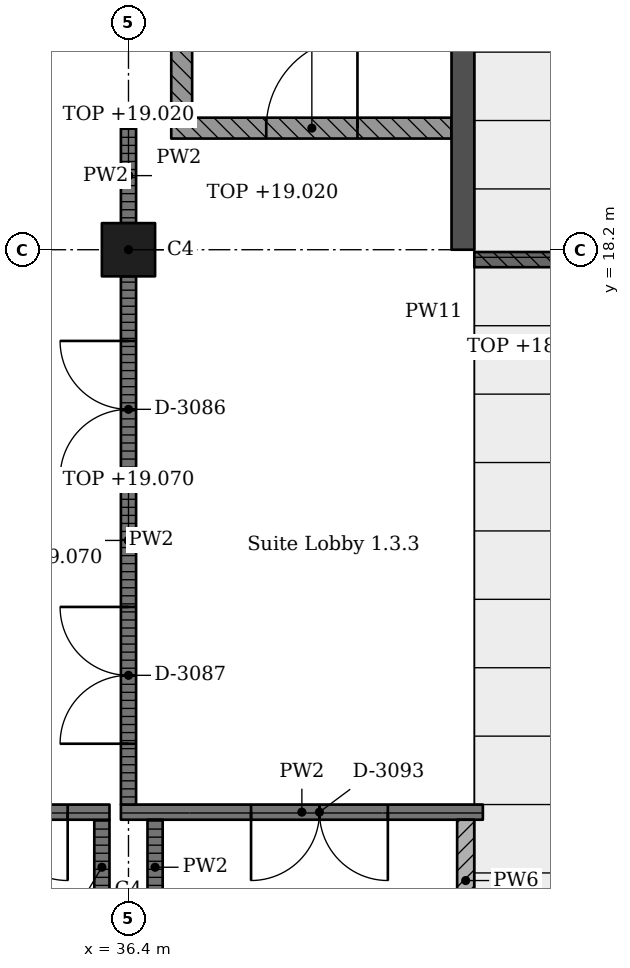
"""IFC4 building model, lengths in metres.
Left out: names, types, materials, properties, quantities, classifications, styles, units other than length and angle.
Written with IfcOpenShell. Run it as: python <this file> out.ifc"""

import sys

from ifc_helpers import new_model, si_unit, direction, frame, frame_2d, origin, origin_2d, place, context, subcontext, project, spatial, rectangle, extrude, element, fill, save


model = new_model("IFC4")
c1 = context("Model", 3, precision=1e-05, world=origin(), true_north=direction((0.0, 1.0)))
c2 = subcontext(c1, "Body", "Model", "MODEL_VIEW")
j1 = project(units=[si_unit("LENGTHUNIT", "METRE"), si_unit("PLANEANGLEUNIT", "RADIAN")], contexts=[c1])
p1 = place(None, origin())
s1 = spatial("IfcSite", under=j1, at=p1, CompositionType="ELEMENT")
p2 = place(p1, origin())
s2 = spatial("IfcBuilding", under=s1, at=p2, CompositionType="ELEMENT")
p3 = place(p2, frame((0.0, 0.0, 15.47)))
s3 = spatial("IfcBuildingStorey", under=s2, at=p3, CompositionType="ELEMENT", Elevation=15.47)
p4 = place(p3, frame((36.4, 18.2, 0.0), z_axis=(0.0, 0.0, 1.0), x_axis=(1.0, 0.0, 0.0)))
e1 = element("IfcColumn", 1, at=p4, inside=s3, PredefinedType="COLUMN", context=c2, shape_type="SweptSolid", body=[
    extrude(rectangle(XDim=0.7, YDim=0.7, at=origin_2d()), origin(), (0.0, 0.0, 1.0), 4.55),
])
p5 = place(p3, frame((40.8, 40.95, 0.0), z_axis=(0.0, 0.0, 1.0), x_axis=(0.0, -1.0, 0.0)))
e2 = element("IfcWall", 2, at=p5, inside=s3, PredefinedType="SHEAR", context=c2, shape_type="SweptSolid", body=[
    extrude(rectangle(XDim=22.75, YDim=0.3, at=frame_2d((11.375, 0.0))), origin(), (0.0, 0.0, 1.0), 4.55),
])
p6 = place(p3, frame((36.05, 9.45, 0.0), z_axis=(0.0, 0.0, 1.0), x_axis=(0.0, 1.0, 0.0)))
e3 = element("IfcWall", 3, at=p6, inside=s3, PredefinedType="PARTITIONING", context=c2, shape_type="SweptSolid", body=[
    extrude(rectangle(XDim=1.25, YDim=0.2, at=frame_2d((0.625, 0.0))), origin(), (0.0, 0.0, 1.0), 4.3),
])
p7 = place(p3, frame((36.15, 10.8, 0.0), z_axis=(0.0, 0.0, 1.0), x_axis=(-1.0, 0.0, 0.0)))
e4 = element("IfcWall", 4, at=p7, inside=s3, PredefinedType="PARTITIONING", context=c2, shape_type="SweptSolid", body=[
    extrude(rectangle(XDim=2.85, YDim=0.2, at=frame_2d((1.425, 0.0))), origin(), (0.0, 0.0, 1.0), 4.3),
])
p8 = place(p7, frame((0.55, 0.0, 0.0)))
e5 = element("IfcOpeningElement", 5, at=p8, cuts=e4, PredefinedType="OPENING", context=c2, shape_type="SweptSolid", body=[
    extrude(rectangle(XDim=1.8, YDim=2.4, at=frame_2d((0.9, 1.2))), frame((0.0, 0.11, 0.0), z_axis=(0.0, -1.0, 0.0), x_axis=(1.0, 0.0, 0.0)), (0.0, 0.0, 1.0), 0.22),
])
p9 = place(p3, frame((36.3, 10.8, 0.0), z_axis=(0.0, 0.0, 1.0), x_axis=(1.0, 0.0, 0.0)))
e6 = element("IfcWall", 6, at=p9, inside=s3, PredefinedType="PARTITIONING", context=c2, shape_type="SweptSolid", body=[
    extrude(rectangle(XDim=4.762, YDim=0.2, at=frame_2d((2.381, 0.0))), origin(), (0.0, 0.0, 1.0), 4.3),
])
p10 = place(p9, frame((1.712, 0.0, 0.0)))
e7 = element("IfcOpeningElement", 7, at=p10, cuts=e6, PredefinedType="OPENING", context=c2, shape_type="SweptSolid", body=[
    extrude(rectangle(XDim=1.8, YDim=2.4, at=frame_2d((0.9, 1.2))), frame((0.0, 0.11, 0.0), z_axis=(0.0, -1.0, 0.0), x_axis=(1.0, 0.0, 0.0)), (0.0, 0.0, 1.0), 0.22),
])
p11 = place(p3, frame((36.4, 17.85, 0.0), z_axis=(0.0, 0.0, 1.0), x_axis=(0.0, -1.0, 0.0)))
e8 = element("IfcWall", 8, at=p11, inside=s3, PredefinedType="PARTITIONING", context=c2, shape_type="SweptSolid", body=[
    extrude(rectangle(XDim=6.95, YDim=0.2, at=frame_2d((3.475, 0.0))), origin(), (0.0, 0.0, 1.0), 3.6),
])
p12 = place(p11, frame((0.85, 0.0, 0.0)))
e9 = element("IfcOpeningElement", 9, at=p12, cuts=e8, PredefinedType="OPENING", context=c2, shape_type="SweptSolid", body=[
    extrude(rectangle(XDim=1.8, YDim=2.4, at=frame_2d((0.9, 1.2))), frame((0.0, 0.11, 0.0), z_axis=(0.0, -1.0, 0.0), x_axis=(1.0, 0.0, 0.0)), (0.0, 0.0, 1.0), 0.22),
])
p13 = place(p11, frame((4.35, 0.0, 0.0)))
e10 = element("IfcOpeningElement", 10, at=p13, cuts=e8, PredefinedType="OPENING", context=c2, shape_type="SweptSolid", body=[
    extrude(rectangle(XDim=1.8, YDim=2.4, at=frame_2d((0.9, 1.2))), frame((0.0, 0.11, 0.0), z_axis=(0.0, -1.0, 0.0), x_axis=(1.0, 0.0, 0.0)), (0.0, 0.0, 1.0), 0.22),
])
p14 = place(p3, frame((36.4, 19.8, 0.0), z_axis=(0.0, 0.0, 1.0), x_axis=(0.0, -1.0, 0.0)))
e11 = element("IfcWall", 11, at=p14, inside=s3, PredefinedType="PARTITIONING", context=c2, shape_type="SweptSolid", body=[
    extrude(rectangle(XDim=1.25, YDim=0.2, at=frame_2d((0.625, 0.0))), origin(), (0.0, 0.0, 1.0), 3.55),
])
p15 = place(p3, frame((36.75, 10.7, 0.0), z_axis=(0.0, 0.0, 1.0), x_axis=(0.0, -1.0, 0.0)))
e12 = element("IfcWall", 12, at=p15, inside=s3, PredefinedType="PARTITIONING", context=c2, shape_type="SweptSolid", body=[
    extrude(rectangle(XDim=1.25, YDim=0.2, at=frame_2d((0.625, 0.0))), origin(), (0.0, 0.0, 1.0), 4.3),
])
p16 = place(p3, frame((36.962, 19.8, 0.0), z_axis=(0.0, 0.0, 1.0), x_axis=(1.0, 0.0, 0.0)))
e13 = element("IfcWall", 13, at=p16, inside=s3, PredefinedType="SOLIDWALL", context=c2, shape_type="SweptSolid", body=[
    extrude(rectangle(XDim=3.688, YDim=0.275, at=frame_2d((1.844, 0.0))), origin(), (0.0, 0.0, 1.0), 4.3),
])
p17 = place(p16, frame((1.25, 0.0, 0.0)))
e14 = element("IfcOpeningElement", 14, at=p17, cuts=e13, PredefinedType="OPENING", context=c2, shape_type="SweptSolid", body=[
    extrude(rectangle(XDim=1.2, YDim=2.4, at=frame_2d((0.6, 1.2))), frame((0.0, 0.147, 0.0), z_axis=(0.0, -1.0, 0.0), x_axis=(1.0, 0.0, 0.0)), (0.0, 0.0, 1.0), 0.295),
])
p18 = place(p3, frame((37.1, 26.837, 0.0), z_axis=(0.0, 0.0, 1.0), x_axis=(0.0, -1.0, 0.0)))
e15 = element("IfcWall", 15, at=p18, inside=s3, PredefinedType="SOLIDWALL", context=c2, shape_type="SweptSolid", body=[
    extrude(rectangle(XDim=6.9, YDim=0.275, at=frame_2d((3.45, 0.0))), origin(), (0.0, 0.0, 1.0), 4.3),
])
p19 = place(p3, frame((40.836, 10.7, 0.0), z_axis=(0.0, 0.0, 1.0), x_axis=(0.0, -1.0, 0.0)))
e16 = element("IfcWall", 16, at=p19, inside=s3, PredefinedType="PARTITIONING", context=c2, shape_type="SweptSolid", body=[
    extrude(rectangle(XDim=1.6, YDim=0.225, at=frame_2d((0.8, 0.0))), origin(), (0.0, 0.0, 1.0), 4.3),
])
p20 = place(p3, frame((40.95, 18.07, 0.0), z_axis=(0.0, 0.0, 1.0), x_axis=(1.0, 0.0, 0.0)))
e17 = element("IfcWall", 17, at=p20, inside=s3, PredefinedType="PARTITIONING", context=c2, shape_type="SweptSolid", body=[
    extrude(rectangle(XDim=4.25, YDim=0.2, at=frame_2d((2.125, 0.0))), origin(), (0.0, 0.0, 1.0), 2.91),
])
p21 = place(p20, frame((1.125, 0.0, 1.1)))
e18 = element("IfcOpeningElement", 18, at=p21, cuts=e17, PredefinedType="OPENING", context=c2, shape_type="SweptSolid", body=[
    extrude(rectangle(XDim=2.0, YDim=1.3, at=frame_2d((1.0, 0.65))), frame((0.0, 0.11, 0.0), z_axis=(0.0, -1.0, 0.0), x_axis=(1.0, 0.0, 0.0)), (0.0, 0.0, 1.0), 0.22),
])
p22 = place(p17, origin())
e19 = element("IfcDoor", 19, at=p22, inside=s3, OperationType="SINGLE_SWING_LEFT", PredefinedType="DOOR", context=c2, shape_type="SweptSolid", body=[
    extrude(rectangle(XDim=1.2, YDim=2.4, at=frame_2d((0.6, 1.2))), frame((0.0, 0.025, 0.0), z_axis=(0.0, -1.0, 0.0), x_axis=(1.0, 0.0, 0.0)), (0.0, 0.0, 1.0), 0.05),
])
fill(e14, e19)
p23 = place(p12, origin())
e20 = element("IfcDoor", 20, at=p23, inside=s3, OperationType="DOUBLE_DOOR_SINGLE_SWING", PredefinedType="DOOR", context=c2, shape_type="SweptSolid", body=[
    extrude(rectangle(XDim=1.8, YDim=2.4, at=frame_2d((0.9, 1.2))), frame((0.0, 0.025, 0.0), z_axis=(0.0, -1.0, 0.0), x_axis=(1.0, 0.0, 0.0)), (0.0, 0.0, 1.0), 0.05),
])
fill(e9, e20)
p24 = place(p13, origin())
e21 = element("IfcDoor", 21, at=p24, inside=s3, OperationType="DOUBLE_DOOR_SINGLE_SWING", PredefinedType="DOOR", context=c2, shape_type="SweptSolid", body=[
    extrude(rectangle(XDim=1.8, YDim=2.4, at=frame_2d((0.9, 1.2))), frame((0.0, 0.025, 0.0), z_axis=(0.0, -1.0, 0.0), x_axis=(1.0, 0.0, 0.0)), (0.0, 0.0, 1.0), 0.05),
])
fill(e10, e21)
p25 = place(p8, origin())
e22 = element("IfcDoor", 22, at=p25, inside=s3, OperationType="DOUBLE_DOOR_SINGLE_SWING", PredefinedType="DOOR", context=c2, shape_type="SweptSolid", body=[
    extrude(rectangle(XDim=1.8, YDim=2.4, at=frame_2d((0.9, 1.2))), frame((0.0, 0.025, 0.0), z_axis=(0.0, -1.0, 0.0), x_axis=(1.0, 0.0, 0.0)), (0.0, 0.0, 1.0), 0.05),
])
fill(e5, e22)
p26 = place(p10, origin())
e23 = element("IfcDoor", 23, at=p26, inside=s3, OperationType="DOUBLE_DOOR_SINGLE_SWING", PredefinedType="DOOR", context=c2, shape_type="SweptSolid", body=[
    extrude(rectangle(XDim=1.8, YDim=2.4, at=frame_2d((0.9, 1.2))), frame((0.0, 0.025, 0.0), z_axis=(0.0, -1.0, 0.0), x_axis=(1.0, 0.0, 0.0)), (0.0, 0.0, 1.0), 0.05),
])
fill(e7, e23)
save(model, sys.argv[1])
